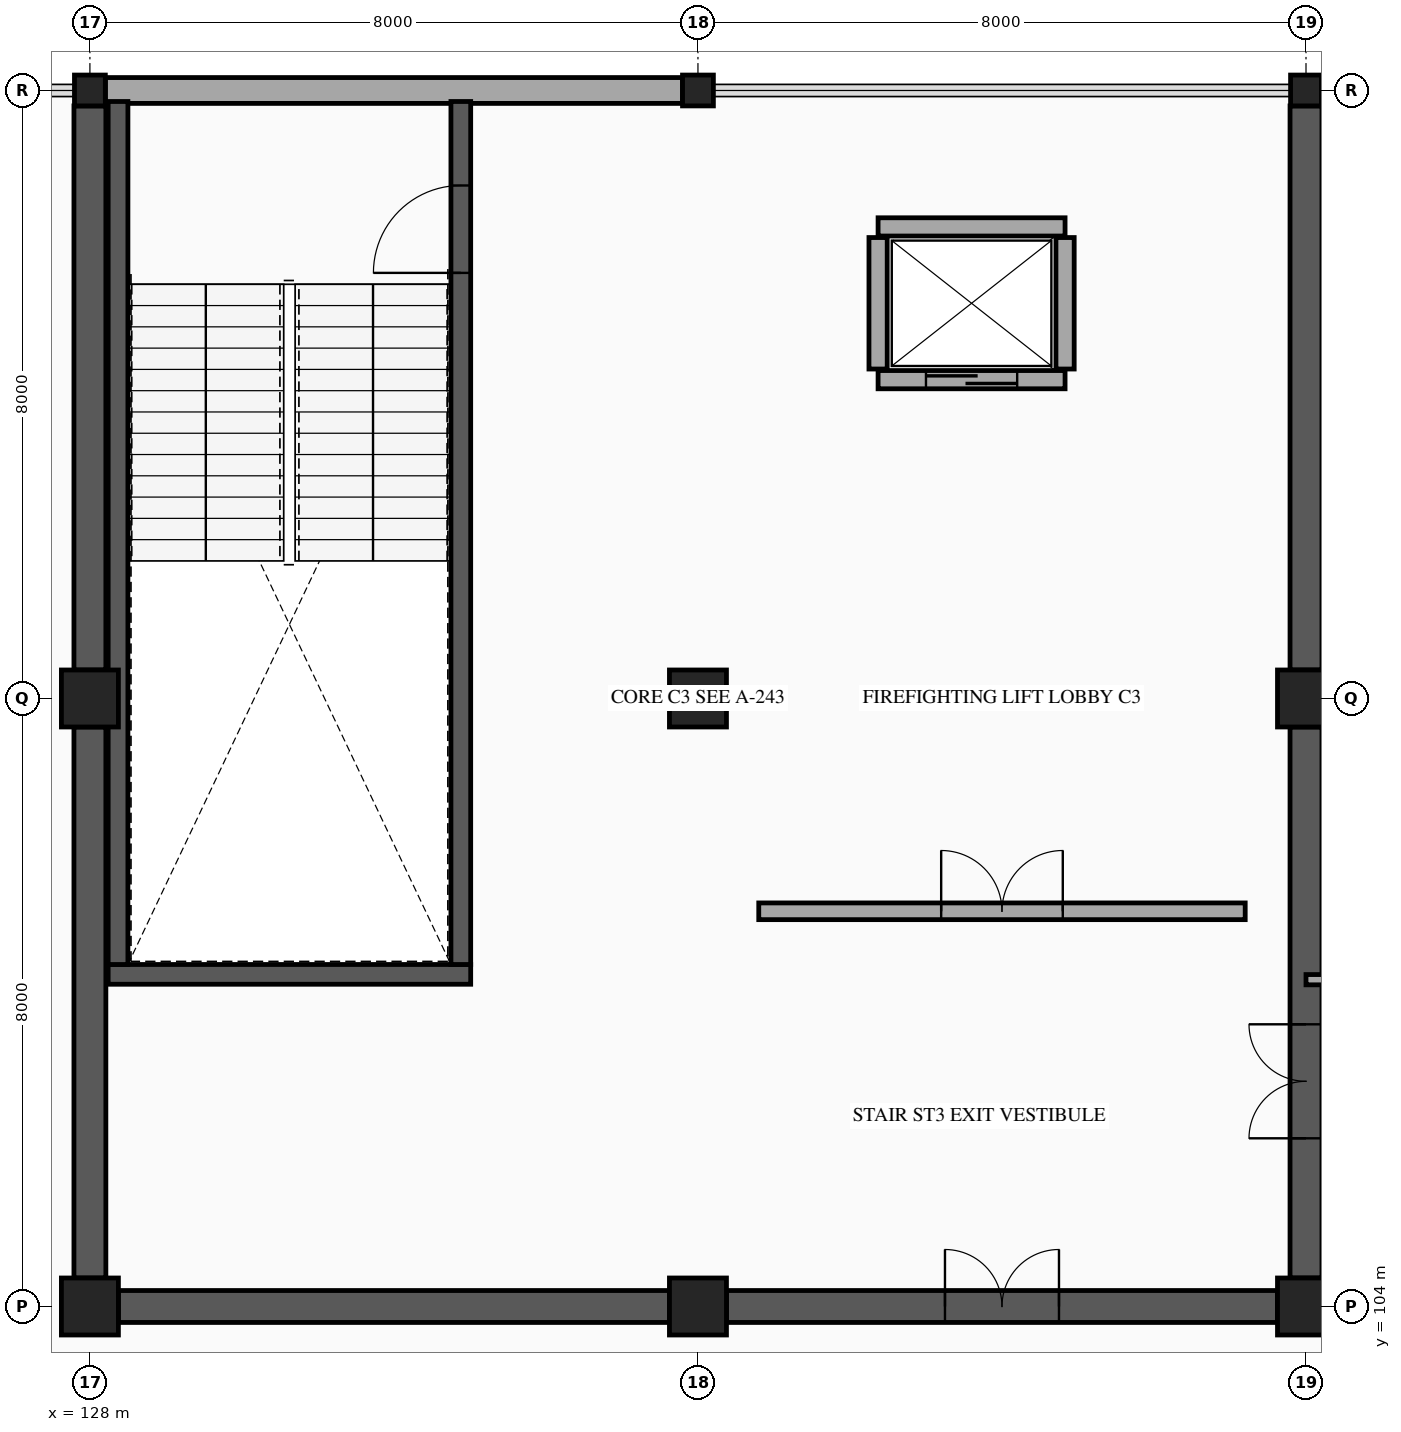
"""IFC4 building model, lengths in metres.
Left out: names, types, materials, properties, quantities, classifications, styles, units other than length and angle.
Written with IfcOpenShell. Run it as: python <this file> out.ifc"""

import sys

from ifc_helpers import new_model, si_unit, direction, frame, frame_2d, origin, origin_2d, place, context, subcontext, project, spatial, rectangle, hollow_rectangle, extrude, element, fill, save


model = new_model("IFC4")
c1 = context("Model", 3, precision=1e-05, world=origin(), true_north=direction((0.0, 1.0)))
c2 = subcontext(c1, "Body", "Model", "MODEL_VIEW")
j1 = project(units=[si_unit("LENGTHUNIT", "METRE"), si_unit("PLANEANGLEUNIT", "RADIAN")], contexts=[c1])
p1 = place(None, origin())
s1 = spatial("IfcSite", under=j1, at=p1, CompositionType="ELEMENT")
p2 = place(p1, origin())
s2 = spatial("IfcBuilding", under=s1, at=p2, CompositionType="ELEMENT")
p3 = place(p2, frame((0.0, 0.0, 5.6)))
s3 = spatial("IfcBuildingStorey", under=s2, at=p3, CompositionType="ELEMENT", Elevation=5.6)
for number, where, z_axis, x_axis in (
    (1, (128.0, 104.0, 0.0), (0.0, 0.0, 1.0), (1.0, 0.0, 0.0)),
    (2, (128.0, 112.0, 0.0), (0.0, 0.0, 1.0), (1.0, 0.0, 0.0)),
):
    element("IfcColumn", number, at=place(p3, frame(where, z_axis=z_axis, x_axis=x_axis)), inside=s3, PredefinedType="COLUMN", context=c2, shape_type="SweptSolid", body=[
        extrude(rectangle(XDim=0.75, YDim=0.75, at=origin_2d()), origin(), (0.0, 0.0, 1.0), 4.8),
    ])
p4 = place(p3, frame((128.0, 120.0, 0.0), z_axis=(0.0, 0.0, 1.0), x_axis=(1.0, 0.0, 0.0)))
e3 = element("IfcColumn", 3, at=p4, inside=s3, PredefinedType="COLUMN", context=c2, shape_type="SweptSolid", body=[
    extrude(hollow_rectangle(XDim=0.406, YDim=0.406, WallThickness=0.015, InnerFilletRadius=0.015, OuterFilletRadius=0.029, at=origin_2d()), origin(), (0.0, 0.0, 1.0), 4.8),
])
for number, where, z_axis, x_axis in (
    (4, (136.0, 104.0, 0.0), (0.0, 0.0, 1.0), (1.0, 0.0, 0.0)),
    (5, (136.0, 112.0, 0.0), (0.0, 0.0, 1.0), (1.0, 0.0, 0.0)),
):
    element("IfcColumn", number, at=place(p3, frame(where, z_axis=z_axis, x_axis=x_axis)), inside=s3, PredefinedType="COLUMN", context=c2, shape_type="SweptSolid", body=[
        extrude(rectangle(XDim=0.75, YDim=0.75, at=origin_2d()), origin(), (0.0, 0.0, 1.0), 4.8),
    ])
p5 = place(p3, frame((136.0, 120.0, 0.0), z_axis=(0.0, 0.0, 1.0), x_axis=(1.0, 0.0, 0.0)))
e6 = element("IfcColumn", 6, at=p5, inside=s3, PredefinedType="COLUMN", context=c2, shape_type="SweptSolid", body=[
    extrude(hollow_rectangle(XDim=0.406, YDim=0.406, WallThickness=0.015, InnerFilletRadius=0.015, OuterFilletRadius=0.029, at=origin_2d()), origin(), (0.0, 0.0, 1.0), 4.8),
])
for number, where, z_axis, x_axis in (
    (7, (144.0, 104.0, 0.0), (0.0, 0.0, 1.0), (1.0, 0.0, 0.0)),
    (8, (144.0, 112.0, 0.0), (0.0, 0.0, 1.0), (1.0, 0.0, 0.0)),
):
    element("IfcColumn", number, at=place(p3, frame(where, z_axis=z_axis, x_axis=x_axis)), inside=s3, PredefinedType="COLUMN", context=c2, shape_type="SweptSolid", body=[
        extrude(rectangle(XDim=0.75, YDim=0.75, at=origin_2d()), origin(), (0.0, 0.0, 1.0), 4.8),
    ])
p6 = place(p3, frame((144.0, 120.0, 0.0), z_axis=(0.0, 0.0, 1.0), x_axis=(1.0, 0.0, 0.0)))
e9 = element("IfcColumn", 9, at=p6, inside=s3, PredefinedType="COLUMN", context=c2, shape_type="SweptSolid", body=[
    extrude(hollow_rectangle(XDim=0.406, YDim=0.406, WallThickness=0.015, InnerFilletRadius=0.015, OuterFilletRadius=0.029, at=origin_2d()), origin(), (0.0, 0.0, 1.0), 4.8),
])
p7 = place(p3, frame((128.203, 120.0, 0.0), z_axis=(0.0, 0.0, 1.0), x_axis=(1.0, 0.0, 0.0)))
e10 = element("IfcWall", 10, at=p7, inside=s3, PredefinedType="STANDARD", context=c2, shape_type="SweptSolid", body=[
    extrude(rectangle(XDim=7.594, YDim=0.34, at=frame_2d((3.797, 0.0))), origin(), (0.0, 0.0, 1.0), 3.78),
])
p8 = place(p3, frame((128.24, 108.37, 0.0), z_axis=(0.0, 0.0, 1.0), x_axis=(1.0, 0.0, 0.0)))
e11 = element("IfcWall", 11, at=p8, inside=s3, PredefinedType="SHEAR", context=c2, shape_type="SweptSolid", body=[
    extrude(rectangle(XDim=4.77, YDim=0.26, at=frame_2d((2.385, 0.0))), origin(), (0.0, 0.0, 1.0), 4.58),
])
p9 = place(p3, frame((128.37, 108.5, 0.0), z_axis=(0.0, 0.0, 1.0), x_axis=(0.0, 1.0, 0.0)))
e12 = element("IfcWall", 12, at=p9, inside=s3, PredefinedType="SHEAR", context=c2, shape_type="SweptSolid", body=[
    extrude(rectangle(XDim=11.355, YDim=0.26, at=frame_2d((5.677, 0.0))), origin(), (0.0, 0.0, 1.0), 4.58),
])
p10 = place(p3, frame((132.88, 108.5, 0.0), z_axis=(0.0, 0.0, 1.0), x_axis=(0.0, 1.0, 0.0)))
e13 = element("IfcWall", 13, at=p10, inside=s3, PredefinedType="SHEAR", context=c2, shape_type="SweptSolid", body=[
    extrude(rectangle(XDim=11.355, YDim=0.26, at=frame_2d((5.677, 0.0))), origin(), (0.0, 0.0, 1.0), 4.58),
])
p11 = place(p10, frame((9.1, 0.0, 0.0)))
e14 = element("IfcOpeningElement", 14, at=p11, cuts=e13, PredefinedType="OPENING", context=c2, shape_type="SweptSolid", body=[
    extrude(rectangle(XDim=1.15, YDim=2.15, at=frame_2d((0.575, 1.075))), frame((0.0, 0.14, 0.0), z_axis=(0.0, -1.0, 0.0), x_axis=(1.0, 0.0, 0.0)), (0.0, 0.0, 1.0), 0.28),
])
p12 = place(p3, frame((128.375, 104.0, 0.0), z_axis=(0.0, 0.0, 1.0), x_axis=(1.0, 0.0, 0.0)))
e15 = element("IfcWall", 15, at=p12, inside=s3, PredefinedType="SHEAR", context=c2, shape_type="SweptSolid", body=[
    extrude(rectangle(XDim=7.25, YDim=0.42, at=frame_2d((3.625, 0.0))), origin(), (0.0, 0.0, 1.0), 4.58),
])
p13 = place(p3, frame((136.375, 104.0, 0.0), z_axis=(0.0, 0.0, 1.0), x_axis=(1.0, 0.0, 0.0)))
e16 = element("IfcWall", 16, at=p13, inside=s3, PredefinedType="SHEAR", context=c2, shape_type="SweptSolid", body=[
    extrude(rectangle(XDim=7.25, YDim=0.42, at=frame_2d((3.625, 0.0))), origin(), (0.0, 0.0, 1.0), 4.58),
])
p14 = place(p13, frame((2.875, 0.0, 0.0)))
e17 = element("IfcOpeningElement", 17, at=p14, cuts=e16, PredefinedType="OPENING", context=c2, shape_type="SweptSolid", body=[
    extrude(rectangle(XDim=1.5, YDim=2.15, at=frame_2d((0.75, 1.075))), frame((0.0, 0.22, 0.0), z_axis=(0.0, -1.0, 0.0), x_axis=(1.0, 0.0, 0.0)), (0.0, 0.0, 1.0), 0.44),
])
p15 = place(p3, frame((128.0, 104.375, 0.0), z_axis=(0.0, 0.0, 1.0), x_axis=(0.0, 1.0, 0.0)))
e18 = element("IfcWall", 18, at=p15, inside=s3, PredefinedType="SHEAR", context=c2, shape_type="SweptSolid", body=[
    extrude(rectangle(XDim=7.25, YDim=0.42, at=frame_2d((3.625, 0.0))), origin(), (0.0, 0.0, 1.0), 4.58),
])
p16 = place(p3, frame((128.0, 112.375, 0.0), z_axis=(0.0, 0.0, 1.0), x_axis=(0.0, 1.0, 0.0)))
e19 = element("IfcWall", 19, at=p16, inside=s3, PredefinedType="SHEAR", context=c2, shape_type="SweptSolid", body=[
    extrude(rectangle(XDim=7.422, YDim=0.42, at=frame_2d((3.711, 0.0))), origin(), (0.0, 0.0, 1.0), 4.58),
])
p17 = place(p3, frame((144.0, 104.375, 0.0), z_axis=(0.0, 0.0, 1.0), x_axis=(0.0, 1.0, 0.0)))
e20 = element("IfcWall", 20, at=p17, inside=s3, PredefinedType="SHEAR", context=c2, shape_type="SweptSolid", body=[
    extrude(rectangle(XDim=7.25, YDim=0.42, at=frame_2d((3.625, 0.0))), origin(), (0.0, 0.0, 1.0), 4.58),
])
p18 = place(p17, frame((1.838, 0.0, 0.0)))
e21 = element("IfcOpeningElement", 21, at=p18, cuts=e20, PredefinedType="OPENING", context=c2, shape_type="SweptSolid", body=[
    extrude(rectangle(XDim=1.5, YDim=2.15, at=frame_2d((0.75, 1.075))), frame((0.0, 0.22, 0.0), z_axis=(0.0, -1.0, 0.0), x_axis=(1.0, 0.0, 0.0)), (0.0, 0.0, 1.0), 0.44),
])
p19 = place(p3, frame((144.0, 112.375, 0.0), z_axis=(0.0, 0.0, 1.0), x_axis=(0.0, 1.0, 0.0)))
e22 = element("IfcWall", 22, at=p19, inside=s3, PredefinedType="SHEAR", context=c2, shape_type="SweptSolid", body=[
    extrude(rectangle(XDim=7.422, YDim=0.42, at=frame_2d((3.711, 0.0))), origin(), (0.0, 0.0, 1.0), 4.58),
])
p20 = place(p3, frame((138.37, 116.195, 0.0), z_axis=(0.0, 0.0, 1.0), x_axis=(1.0, 0.0, 0.0)))
e23 = element("IfcWall", 23, at=p20, inside=s3, PredefinedType="PARTITIONING", context=c2, shape_type="SweptSolid", body=[
    extrude(rectangle(XDim=2.46, YDim=0.24, at=frame_2d((1.23, 0.0))), origin(), (0.0, 0.0, 1.0), 4.58),
])
p21 = place(p20, frame((0.63, 0.0, 0.0)))
e24 = element("IfcOpeningElement", 24, at=p21, cuts=e23, PredefinedType="OPENING", context=c2, shape_type="SweptSolid", body=[
    extrude(rectangle(XDim=1.2, YDim=2.15, at=frame_2d((0.6, 1.075))), frame((0.0, 0.13, 0.0), z_axis=(0.0, -1.0, 0.0), x_axis=(1.0, 0.0, 0.0)), (0.0, 0.0, 1.0), 0.26),
])
p22 = place(p3, frame((138.37, 118.205, 0.0), z_axis=(0.0, 0.0, 1.0), x_axis=(1.0, 0.0, 0.0)))
e25 = element("IfcWall", 25, at=p22, inside=s3, PredefinedType="PARTITIONING", context=c2, shape_type="SweptSolid", body=[
    extrude(rectangle(XDim=2.46, YDim=0.24, at=frame_2d((1.23, 0.0))), origin(), (0.0, 0.0, 1.0), 4.58),
])
for number, where, z_axis, x_axis in (
    (26, (138.37, 116.335, 0.0), (0.0, 0.0, 1.0), (0.0, 1.0, 0.0)),
    (27, (140.83, 116.335, 0.0), (0.0, 0.0, 1.0), (0.0, 1.0, 0.0)),
):
    element("IfcWall", number, at=place(p3, frame(where, z_axis=z_axis, x_axis=x_axis)), inside=s3, PredefinedType="PARTITIONING", context=c2, shape_type="SweptSolid", body=[
        extrude(rectangle(XDim=1.73, YDim=0.24, at=frame_2d((0.865, 0.0))), origin(), (0.0, 0.0, 1.0), 4.58),
    ])
p23 = place(p3, frame((136.8, 109.2, 0.0), z_axis=(0.0, 0.0, 1.0), x_axis=(1.0, 0.0, 0.0)))
e28 = element("IfcWall", 28, at=p23, inside=s3, PredefinedType="PARTITIONING", context=c2, shape_type="SweptSolid", body=[
    extrude(rectangle(XDim=6.4, YDim=0.22, at=frame_2d((3.2, 0.0))), origin(), (0.0, 0.0, 1.0), 3.78),
])
p24 = place(p23, frame((2.4, 0.0, 0.0)))
e29 = element("IfcOpeningElement", 29, at=p24, cuts=e28, PredefinedType="OPENING", context=c2, shape_type="SweptSolid", body=[
    extrude(rectangle(XDim=1.6, YDim=2.15, at=frame_2d((0.8, 1.075))), frame((0.0, 0.12, 0.0), z_axis=(0.0, -1.0, 0.0), x_axis=(1.0, 0.0, 0.0)), (0.0, 0.0, 1.0), 0.24),
])
p25 = place(p3, frame((144.0, 108.3, 0.0), z_axis=(0.0, 0.0, 1.0), x_axis=(1.0, 0.0, 0.0)))
e30 = element("IfcWall", 30, at=p25, inside=s3, PredefinedType="PARTITIONING", context=c2, shape_type="SweptSolid", body=[
    extrude(rectangle(XDim=31.85, YDim=0.135, at=frame_2d((15.925, 0.0))), origin(), (0.0, 0.0, 1.0), 3.78),
])
p26 = place(p25, frame((27.485, 0.0, 0.0)))
e31 = element("IfcOpeningElement", 31, at=p26, cuts=e30, PredefinedType="OPENING", context=c2, shape_type="SweptSolid", body=[
    extrude(rectangle(XDim=1.0, YDim=2.15, at=frame_2d((0.5, 1.075))), frame((0.0, 0.077, 0.0), z_axis=(0.0, -1.0, 0.0), x_axis=(1.0, 0.0, 0.0)), (0.0, 0.0, 1.0), 0.155),
])
p27 = place(p11, origin())
e32 = element("IfcDoor", 32, at=p27, inside=s3, OperationType="SINGLE_SWING_LEFT", PredefinedType="DOOR", context=c2, shape_type="SweptSolid", body=[
    extrude(rectangle(XDim=1.15, YDim=2.15, at=frame_2d((0.575, 1.075))), frame((0.0, 0.025, 0.0), z_axis=(0.0, -1.0, 0.0), x_axis=(1.0, 0.0, 0.0)), (0.0, 0.0, 1.0), 0.05),
])
fill(e14, e32)
p28 = place(p14, origin())
e33 = element("IfcDoor", 33, at=p28, inside=s3, OperationType="DOUBLE_DOOR_SINGLE_SWING", PredefinedType="DOOR", context=c2, shape_type="SweptSolid", body=[
    extrude(rectangle(XDim=1.5, YDim=2.15, at=frame_2d((0.75, 1.075))), frame((0.0, 0.025, 0.0), z_axis=(0.0, -1.0, 0.0), x_axis=(1.0, 0.0, 0.0)), (0.0, 0.0, 1.0), 0.05),
])
fill(e17, e33)
p29 = place(p18, origin())
e34 = element("IfcDoor", 34, at=p29, inside=s3, OperationType="DOUBLE_DOOR_SINGLE_SWING", PredefinedType="DOOR", context=c2, shape_type="SweptSolid", body=[
    extrude(rectangle(XDim=1.5, YDim=2.15, at=frame_2d((0.75, 1.075))), frame((0.0, 0.025, 0.0), z_axis=(0.0, -1.0, 0.0), x_axis=(1.0, 0.0, 0.0)), (0.0, 0.0, 1.0), 0.05),
])
fill(e21, e34)
p30 = place(p21, origin())
e35 = element("IfcDoor", 35, at=p30, inside=s3, OperationType="SLIDING_TO_LEFT", PredefinedType="DOOR", context=c2, shape_type="SweptSolid", body=[
    extrude(rectangle(XDim=1.2, YDim=2.15, at=frame_2d((0.6, 1.075))), frame((0.0, 0.025, 0.0), z_axis=(0.0, -1.0, 0.0), x_axis=(1.0, 0.0, 0.0)), (0.0, 0.0, 1.0), 0.05),
])
fill(e24, e35)
p31 = place(p24, origin())
e36 = element("IfcDoor", 36, at=p31, inside=s3, OperationType="DOUBLE_DOOR_SINGLE_SWING", PredefinedType="DOOR", context=c2, shape_type="SweptSolid", body=[
    extrude(rectangle(XDim=1.6, YDim=2.15, at=frame_2d((0.8, 1.075))), frame((0.0, 0.025, 0.0), z_axis=(0.0, -1.0, 0.0), x_axis=(1.0, 0.0, 0.0)), (0.0, 0.0, 1.0), 0.05),
])
fill(e29, e36)
save(model, sys.argv[1])
